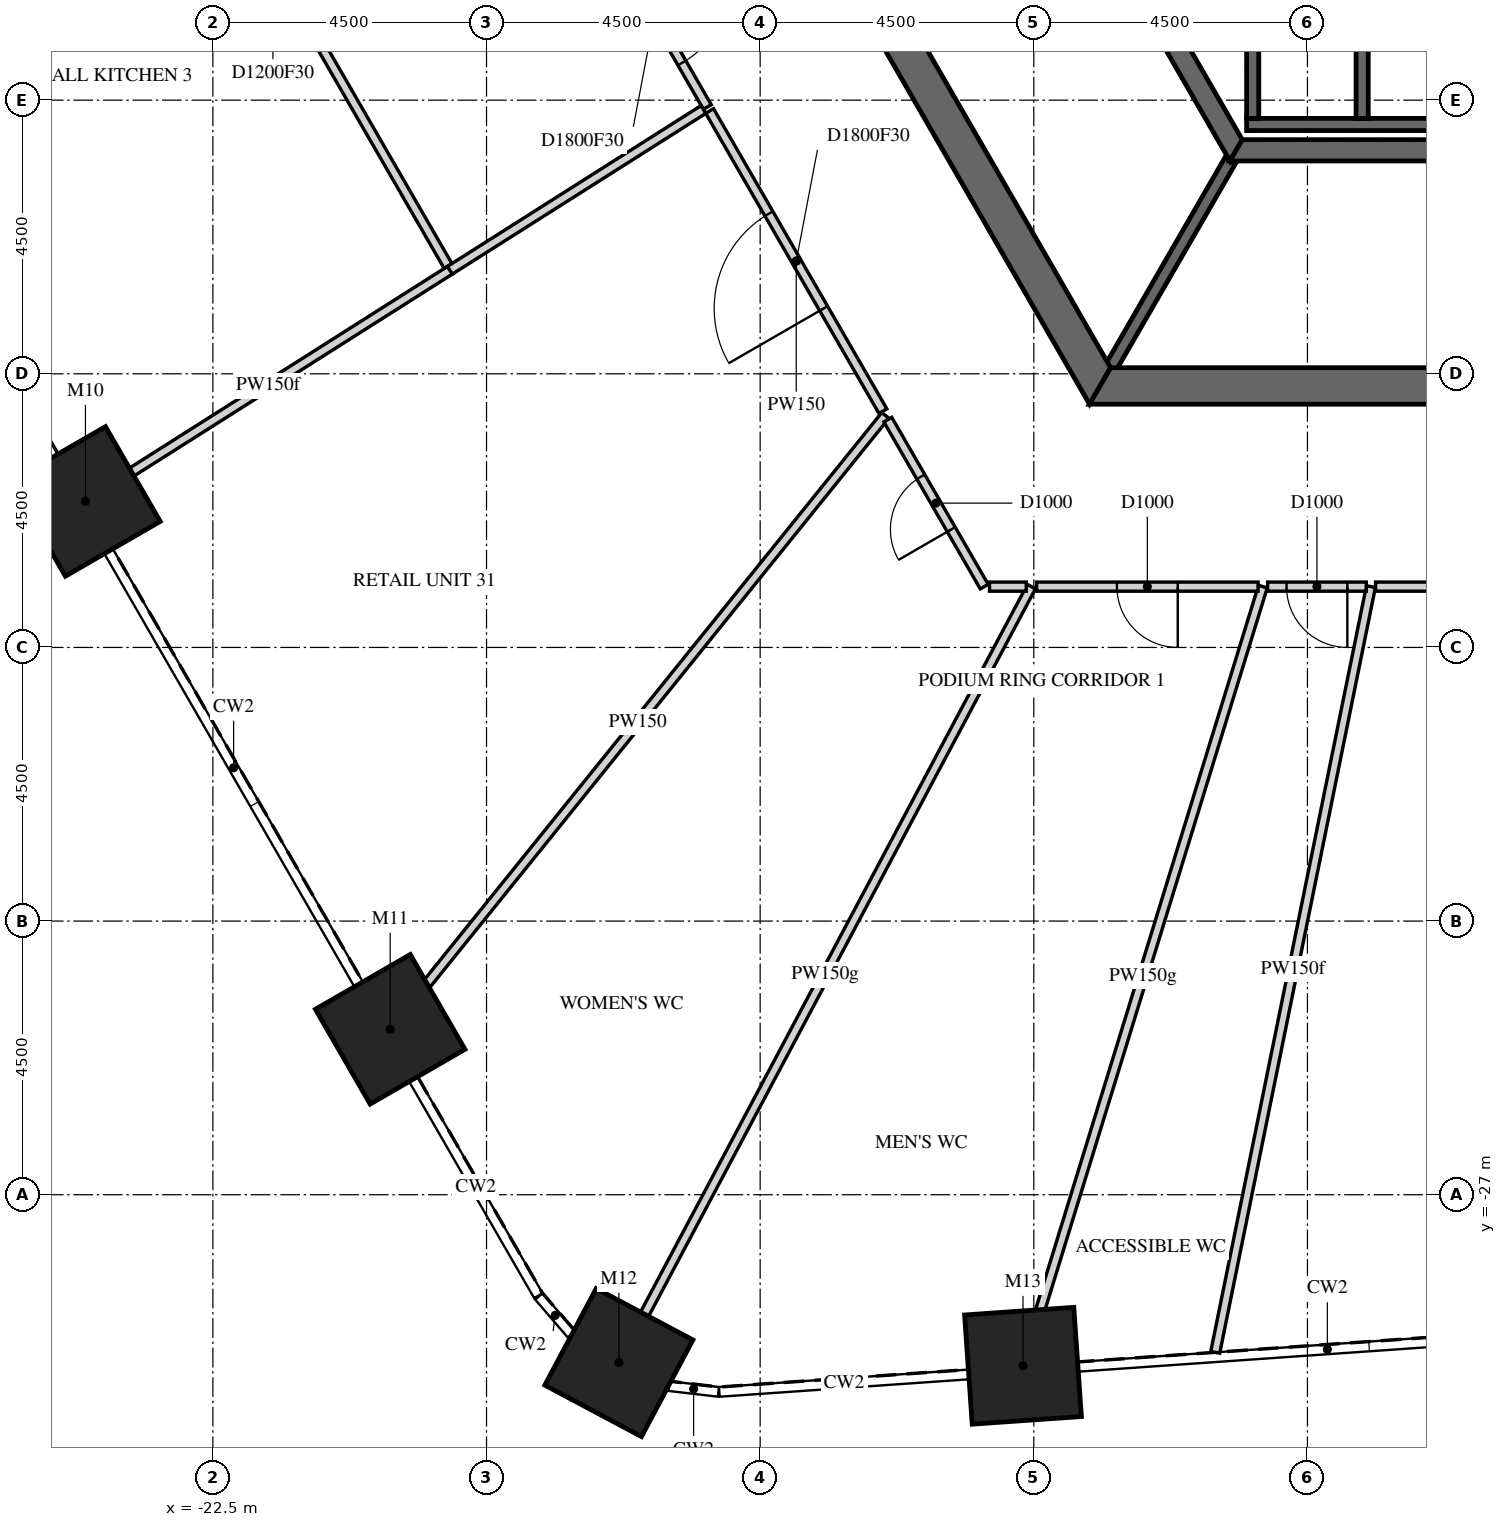
"""IFC4 building model, lengths in metres.
Left out: names, types, materials, properties, quantities, classifications, styles, units other than length and angle.
Written with IfcOpenShell. Run it as: python <this file> out.ifc"""

import sys

from ifc_helpers import new_model, si_unit, direction, frame, frame_2d, origin, origin_2d, place, context, subcontext, project, spatial, polyline, rectangle, outline, extrude, element, fill, save


model = new_model("IFC4")
c1 = context("Model", 3, precision=1e-05, world=origin(), true_north=direction((0.0, 1.0)))
c2 = subcontext(c1, "Body", "Model", "MODEL_VIEW")
j1 = project(units=[si_unit("LENGTHUNIT", "METRE"), si_unit("PLANEANGLEUNIT", "RADIAN")], contexts=[c1])
p1 = place(None, origin())
s1 = spatial("IfcSite", under=j1, at=p1, CompositionType="ELEMENT")
p2 = place(p1, origin())
s2 = spatial("IfcBuilding", under=s1, at=p2, CompositionType="ELEMENT")
p3 = place(p2, frame((0.0, 0.0, 20.5)))
s3 = spatial("IfcBuildingStorey", under=s2, at=p3, CompositionType="ELEMENT", Elevation=20.5)
for number, where, z_axis, x_axis in (
    (1, (-24.596, -15.599, -0.25), (0.0, 0.0, 1.0), (-0.5, 0.866, 0.0)),
    (2, (-19.584, -24.28, -0.25), (0.0, 0.0, 1.0), (-0.5, 0.866, 0.0)),
    (3, (-15.823, -29.76, -0.25), (0.0, 0.0, 1.0), (-0.883, 0.469, 0.0)),
    (4, (-9.177, -29.813, -0.25), (0.0, 0.0, 1.0), (-0.998, -0.07, 0.0)),
):
    element("IfcColumn", number, at=place(p3, frame(where, z_axis=z_axis, x_axis=x_axis)), inside=s3, PredefinedType="COLUMN", context=c2, shape_type="SweptSolid", body=[
        extrude(rectangle(XDim=1.8, YDim=1.8, at=origin_2d()), origin(), (0.0, 0.0, 1.0), 5.5),
    ])
p4 = place(p3, frame((-15.819, 0.0, -0.25), z_axis=(0.0, 0.0, 1.0), x_axis=(0.499999880136, -0.866025472988, 0.0)))
e5 = element("IfcWall", 5, at=p4, inside=s3, PredefinedType="SHEAR", context=c2, shape_type="SweptSolid", body=[
    extrude(outline(polyline([(-0.173, -0.3), (15.993, -0.3), (15.646, 0.3), (0.173, 0.3), (-0.173, -0.3)])), origin(), (0.0, 0.0, 1.0), 5.5),
])
p5 = place(p4, frame((6.981, 0.0, 0.25)))
e6 = element("IfcOpeningElement", 6, at=p5, cuts=e5, PredefinedType="OPENING", context=c2, shape_type="SweptSolid", body=[
    extrude(rectangle(XDim=1.8, YDim=2.4, at=frame_2d((0.9, 1.2))), frame((0.0, 0.31, 0.0), z_axis=(0.0, -1.0, 0.0), x_axis=(1.0, 0.0, 0.0)), (0.0, 0.0, 1.0), 0.62),
])
p6 = place(p3, frame((-7.91, -13.7, -0.25), z_axis=(0.0, 0.0, 1.0), x_axis=(1.0, 0.0, 0.0)))
e7 = element("IfcWall", 7, at=p6, inside=s3, PredefinedType="SHEAR", context=c2, shape_type="SweptSolid", body=[
    extrude(outline(polyline([(-0.173, -0.3), (15.993, -0.3), (15.646, 0.3), (0.173, 0.3), (-0.173, -0.3)])), origin(), (0.0, 0.0, 1.0), 5.5),
])
p7 = place(p6, frame((7.31, 0.0, 0.25)))
e8 = element("IfcOpeningElement", 8, at=p7, cuts=e7, PredefinedType="OPENING", context=c2, shape_type="SweptSolid", body=[
    extrude(rectangle(XDim=1.2, YDim=2.4, at=frame_2d((0.6, 1.2))), frame((0.0, 0.31, 0.0), z_axis=(0.0, -1.0, 0.0), x_axis=(1.0, 0.0, 0.0)), (0.0, 0.0, 1.0), 0.62),
])
p8 = place(p3, frame((-11.345, 0.0, -0.25), z_axis=(0.0, 0.0, 1.0), x_axis=(0.499995046907, -0.866028263435, 0.0)))
e9 = element("IfcWall", 9, at=p8, inside=s3, PredefinedType="SHEAR", context=c2, shape_type="SweptSolid", body=[
    extrude(outline(polyline([(-0.101, -0.175), (11.446, -0.175), (11.244, 0.175), (0.101, 0.175), (-0.101, -0.175)])), origin(), (0.0, 0.0, 1.0), 5.5),
])
p9 = place(p8, frame((4.744, 0.0, 0.25)))
e10 = element("IfcOpeningElement", 10, at=p9, cuts=e9, PredefinedType="OPENING", context=c2, shape_type="SweptSolid", body=[
    extrude(rectangle(XDim=1.8, YDim=2.4, at=frame_2d((0.9, 1.2))), frame((0.0, 0.185, 0.0), z_axis=(0.0, -1.0, 0.0), x_axis=(1.0, 0.0, 0.0)), (0.0, 0.0, 1.0), 0.37),
])
p10 = place(p3, frame((-5.673, -9.825, -0.25), z_axis=(0.0, 0.0, 1.0), x_axis=(1.0, 0.0, 0.0)))
e11 = element("IfcWall", 11, at=p10, inside=s3, PredefinedType="SHEAR", context=c2, shape_type="SweptSolid", body=[
    extrude(outline(polyline([(-0.101, -0.175), (11.446, -0.175), (11.244, 0.175), (0.101, 0.175), (-0.101, -0.175)])), origin(), (0.0, 0.0, 1.0), 5.5),
])
p11 = place(p3, frame((-5.5, -9.4, -0.25), z_axis=(0.0, 0.0, 1.0), x_axis=(1.0, 0.0, 0.0)))
e12 = element("IfcWall", 12, at=p11, inside=s3, PredefinedType="SHEAR", context=c2, shape_type="SweptSolid", body=[
    extrude(rectangle(XDim=9.2, YDim=0.2, at=frame_2d((4.6, 0.0))), origin(), (0.0, 0.0, 1.0), 5.5),
])
for number, where, z_axis, x_axis in (
    (13, (-5.4, -9.3, -0.25), (0.0, 0.0, 1.0), (0.0, 1.0, 0.0)),
    (14, (-3.6, -9.3, -0.25), (0.0, 0.0, 1.0), (0.0, 1.0, 0.0)),
):
    element("IfcWall", number, at=place(p3, frame(where, z_axis=z_axis, x_axis=x_axis)), inside=s3, PredefinedType="SHEAR", context=c2, shape_type="SweptSolid", body=[
        extrude(rectangle(XDim=2.9, YDim=0.2, at=frame_2d((1.45, 0.0))), origin(), (0.0, 0.0, 1.0), 5.5),
    ])
p12 = place(p3, frame((-5.773, -10.0, -0.25), z_axis=(0.0, 0.0, 1.0), x_axis=(-0.500038251005, -0.86600331843, 0.0)))
e15 = element("IfcWall", 15, at=p12, inside=s3, PredefinedType="SHEAR", context=c2, shape_type="SweptSolid", body=[
    extrude(rectangle(XDim=3.926, YDim=0.2, at=frame_2d((1.963, 0.0))), origin(), (0.0, 0.0, 1.0), 5.5),
])
p13 = place(p3, frame((-24.596, -15.599, 0.0), z_axis=(0.0, 0.0, 1.0), x_axis=(0.844481327027, 0.535584996339, 0.0)))
e16 = element("IfcWall", 16, at=p13, inside=s3, PredefinedType="PARTITIONING", context=c2, shape_type="SweptSolid", body=[
    extrude(rectangle(XDim=7.116, YDim=0.15, at=frame_2d((3.558, 0.0))), origin(), (0.0, 0.0, 1.0), 4.496),
])
p14 = place(p3, frame((-18.633, -11.728, 0.0), z_axis=(0.0, 0.0, 1.0), x_axis=(-0.499963358889, 0.866046557506, 0.0)))
e17 = element("IfcWall", 17, at=p14, inside=s3, PredefinedType="PARTITIONING", context=c2, shape_type="SweptSolid", body=[
    extrude(rectangle(XDim=11.521, YDim=0.15, at=frame_2d((5.761, 0.0))), origin(), (0.0, 0.0, 1.0), 5.25),
])
p15 = place(p14, frame((5.161, 0.0, 0.0)))
e18 = element("IfcOpeningElement", 18, at=p15, cuts=e17, PredefinedType="OPENING", context=c2, shape_type="SweptSolid", body=[
    extrude(rectangle(XDim=1.2, YDim=2.1, at=frame_2d((0.6, 1.05))), frame((0.0, 0.085, 0.0), z_axis=(0.0, -1.0, 0.0), x_axis=(1.0, 0.0, 0.0)), (0.0, 0.0, 1.0), 0.17),
])
p16 = place(p3, frame((-19.584, -24.28, 0.0), z_axis=(0.0, 0.0, 1.0), x_axis=(0.627807267634, 0.77836882948, 0.0)))
e19 = element("IfcWall", 19, at=p16, inside=s3, PredefinedType="PARTITIONING", context=c2, shape_type="SweptSolid", body=[
    extrude(rectangle(XDim=12.971, YDim=0.15, at=frame_2d((6.485, 0.0))), origin(), (0.0, 0.0, 1.0), 5.25),
])
p17 = place(p3, frame((-18.649, -1.7, 0.0), z_axis=(0.0, 0.0, 1.0), x_axis=(0.499985805234, -0.866033598981, 0.0)))
e20 = element("IfcWall", 20, at=p17, inside=s3, PredefinedType="PARTITIONING", context=c2, shape_type="SweptSolid", body=[
    extrude(rectangle(XDim=8.56, YDim=0.15, at=frame_2d((4.28, 0.0))), origin(), (0.0, 0.0, 1.0), 5.25),
])
p18 = place(p17, frame((0.836, 0.0, 0.0)))
e21 = element("IfcOpeningElement", 21, at=p18, cuts=e20, PredefinedType="OPENING", context=c2, shape_type="SweptSolid", body=[
    extrude(rectangle(XDim=1.8, YDim=2.1, at=frame_2d((0.9, 1.05))), frame((0.0, 0.085, 0.0), z_axis=(0.0, -1.0, 0.0), x_axis=(1.0, 0.0, 0.0)), (0.0, 0.0, 1.0), 0.17),
])
p19 = place(p17, frame((3.38, 0.0, 0.0)))
e22 = element("IfcOpeningElement", 22, at=p19, cuts=e20, PredefinedType="OPENING", context=c2, shape_type="SweptSolid", body=[
    extrude(rectangle(XDim=1.8, YDim=2.1, at=frame_2d((0.9, 1.05))), frame((0.0, 0.085, 0.0), z_axis=(0.0, -1.0, 0.0), x_axis=(1.0, 0.0, 0.0)), (0.0, 0.0, 1.0), 0.17),
])
p20 = place(p17, frame((5.924, 0.0, 0.0)))
e23 = element("IfcOpeningElement", 23, at=p20, cuts=e20, PredefinedType="OPENING", context=c2, shape_type="SweptSolid", body=[
    extrude(rectangle(XDim=1.8, YDim=2.1, at=frame_2d((0.9, 1.05))), frame((0.0, 0.085, 0.0), z_axis=(0.0, -1.0, 0.0), x_axis=(1.0, 0.0, 0.0)), (0.0, 0.0, 1.0), 0.17),
])
p21 = place(p3, frame((-18.603, -11.798, 0.0), z_axis=(0.0, 0.0, 1.0), x_axis=(0.844511305062, 0.535537725677, 0.0)))
e24 = element("IfcWall", 24, at=p21, inside=s3, PredefinedType="PARTITIONING", context=c2, shape_type="SweptSolid", body=[
    extrude(rectangle(XDim=4.938, YDim=0.15, at=frame_2d((2.469, 0.0))), origin(), (0.0, 0.0, 1.0), 4.496),
])
p22 = place(p3, frame((-15.824, -29.76, 0.0), z_axis=(0.0, 0.0, 1.0), x_axis=(0.469487453171, 0.882939143608, 0.0)))
e25 = element("IfcWall", 25, at=p22, inside=s3, PredefinedType="PARTITIONING", context=c2, shape_type="SweptSolid", body=[
    extrude(rectangle(XDim=14.452, YDim=0.15, at=frame_2d((7.226, 0.0))), origin(), (0.0, 0.0, 1.0), 4.488),
])
p23 = place(p3, frame((-11.481, -14.114, 0.0), z_axis=(0.0, 0.0, 1.0), x_axis=(-0.500049947645, 0.865996564577, 0.0)))
e26 = element("IfcWall", 26, at=p23, inside=s3, PredefinedType="PARTITIONING", context=c2, shape_type="SweptSolid", body=[
    extrude(rectangle(XDim=5.7, YDim=0.15, at=frame_2d((2.85, 0.0))), origin(), (0.0, 0.0, 1.0), 5.25),
])
p24 = place(p23, frame((1.95, 0.0, 0.0)))
e27 = element("IfcOpeningElement", 27, at=p24, cuts=e26, PredefinedType="OPENING", context=c2, shape_type="SweptSolid", body=[
    extrude(rectangle(XDim=1.8, YDim=2.1, at=frame_2d((0.9, 1.05))), frame((0.0, 0.085, 0.0), z_axis=(0.0, -1.0, 0.0), x_axis=(1.0, 0.0, 0.0)), (0.0, 0.0, 1.0), 0.17),
])
p25 = place(p3, frame((-9.815, -17.0, 0.0), z_axis=(0.0, 0.0, 1.0), x_axis=(-0.500080068905, 0.865979171045, 0.0)))
e28 = element("IfcWall", 28, at=p25, inside=s3, PredefinedType="PARTITIONING", context=c2, shape_type="SweptSolid", body=[
    extrude(rectangle(XDim=3.171, YDim=0.15, at=frame_2d((1.586, 0.0))), origin(), (0.0, 0.0, 1.0), 5.25),
])
p26 = place(p25, frame((1.086, 0.0, 0.0)))
e29 = element("IfcOpeningElement", 29, at=p26, cuts=e28, PredefinedType="OPENING", context=c2, shape_type="SweptSolid", body=[
    extrude(rectangle(XDim=1.0, YDim=2.1, at=frame_2d((0.5, 1.05))), frame((0.0, 0.085, 0.0), z_axis=(0.0, -1.0, 0.0), x_axis=(1.0, 0.0, 0.0)), (0.0, 0.0, 1.0), 0.17),
])
p27 = place(p3, frame((-9.729, -17.0, 0.0), z_axis=(0.0, 0.0, 1.0), x_axis=(1.0, 0.0, 0.0)))
e30 = element("IfcWall", 30, at=p27, inside=s3, PredefinedType="PARTITIONING", context=c2, shape_type="SweptSolid", body=[
    extrude(rectangle(XDim=0.604, YDim=0.15, at=frame_2d((0.302, 0.0))), origin(), (0.0, 0.0, 1.0), 5.25),
])
p28 = place(p3, frame((-9.177, -29.813, 0.0), z_axis=(0.0, 0.0, 1.0), x_axis=(0.29419717946, 0.955744746048, 0.0)))
e31 = element("IfcWall", 31, at=p28, inside=s3, PredefinedType="PARTITIONING", context=c2, shape_type="SweptSolid", body=[
    extrude(rectangle(XDim=13.406, YDim=0.15, at=frame_2d((6.703, 0.0))), origin(), (0.0, 0.0, 1.0), 4.488),
])
p29 = place(p3, frame((-5.312, -17.0, 0.0), z_axis=(0.0, 0.0, 1.0), x_axis=(-1.0, 0.0, 0.0)))
e32 = element("IfcWall", 32, at=p29, inside=s3, PredefinedType="PARTITIONING", context=c2, shape_type="SweptSolid", body=[
    extrude(rectangle(XDim=3.643, YDim=0.15, at=frame_2d((1.821, 0.0))), origin(), (0.0, 0.0, 1.0), 5.25),
])
p30 = place(p29, frame((1.321, 0.0, 0.0)))
e33 = element("IfcOpeningElement", 33, at=p30, cuts=e32, PredefinedType="OPENING", context=c2, shape_type="SweptSolid", body=[
    extrude(rectangle(XDim=1.0, YDim=2.1, at=frame_2d((0.5, 1.05))), frame((0.0, 0.085, 0.0), z_axis=(0.0, -1.0, 0.0), x_axis=(1.0, 0.0, 0.0)), (0.0, 0.0, 1.0), 0.17),
])
p31 = place(p3, frame((-6.016, -29.592, 0.0), z_axis=(0.0, 0.0, 1.0), x_axis=(0.199231841521, 0.979952383192, 0.0)))
e34 = element("IfcWall", 34, at=p31, inside=s3, PredefinedType="PARTITIONING", context=c2, shape_type="SweptSolid", body=[
    extrude(rectangle(XDim=12.85, YDim=0.15, at=frame_2d((6.425, 0.0))), origin(), (0.0, 0.0, 1.0), 4.496),
])
p32 = place(p3, frame((-3.532, -17.0, 0.0), z_axis=(0.0, 0.0, 1.0), x_axis=(-1.0, 0.0, 0.0)))
e35 = element("IfcWall", 35, at=p32, inside=s3, PredefinedType="PARTITIONING", context=c2, shape_type="SweptSolid", body=[
    extrude(rectangle(XDim=1.622, YDim=0.15, at=frame_2d((0.811, 0.0))), origin(), (0.0, 0.0, 1.0), 5.25),
])
p33 = place(p32, frame((0.311, 0.0, 0.0)))
e36 = element("IfcOpeningElement", 36, at=p33, cuts=e35, PredefinedType="OPENING", context=c2, shape_type="SweptSolid", body=[
    extrude(rectangle(XDim=1.0, YDim=2.1, at=frame_2d((0.5, 1.05))), frame((0.0, 0.085, 0.0), z_axis=(0.0, -1.0, 0.0), x_axis=(1.0, 0.0, 0.0)), (0.0, 0.0, 1.0), 0.17),
])
p34 = place(p3, frame((-3.379, -17.0, 0.0), z_axis=(0.0, 0.0, 1.0), x_axis=(1.0, 0.0, 0.0)))
e37 = element("IfcWall", 37, at=p34, inside=s3, PredefinedType="PARTITIONING", context=c2, shape_type="SweptSolid", body=[
    extrude(rectangle(XDim=3.379, YDim=0.15, at=frame_2d((1.69, 0.0))), origin(), (0.0, 0.0, 1.0), 5.25),
])
p35 = place(p20, origin())
e38 = element("IfcDoor", 38, at=p35, inside=s3, OperationType="DOUBLE_DOOR_SINGLE_SWING", PredefinedType="DOOR", context=c2, shape_type="SweptSolid", body=[
    extrude(rectangle(XDim=1.8, YDim=2.1, at=frame_2d((0.9, 1.05))), frame((0.0, 0.025, 0.0), z_axis=(0.0, -1.0, 0.0), x_axis=(1.0, 0.0, 0.0)), (0.0, 0.0, 1.0), 0.05),
])
fill(e23, e38)
p36 = place(p24, origin())
e39 = element("IfcDoor", 39, at=p36, inside=s3, OperationType="DOUBLE_DOOR_SINGLE_SWING", PredefinedType="DOOR", context=c2, shape_type="SweptSolid", body=[
    extrude(rectangle(XDim=1.8, YDim=2.1, at=frame_2d((0.9, 1.05))), frame((0.0, 0.025, 0.0), z_axis=(0.0, -1.0, 0.0), x_axis=(1.0, 0.0, 0.0)), (0.0, 0.0, 1.0), 0.05),
])
fill(e27, e39)
p37 = place(p26, origin())
e40 = element("IfcDoor", 40, at=p37, inside=s3, OperationType="SINGLE_SWING_LEFT", PredefinedType="DOOR", context=c2, shape_type="SweptSolid", body=[
    extrude(rectangle(XDim=1.0, YDim=2.1, at=frame_2d((0.5, 1.05))), frame((0.0, 0.025, 0.0), z_axis=(0.0, -1.0, 0.0), x_axis=(1.0, 0.0, 0.0)), (0.0, 0.0, 1.0), 0.05),
])
fill(e29, e40)
p38 = place(p30, origin())
e41 = element("IfcDoor", 41, at=p38, inside=s3, OperationType="SINGLE_SWING_LEFT", PredefinedType="DOOR", context=c2, shape_type="SweptSolid", body=[
    extrude(rectangle(XDim=1.0, YDim=2.1, at=frame_2d((0.5, 1.05))), frame((0.0, 0.025, 0.0), z_axis=(0.0, -1.0, 0.0), x_axis=(1.0, 0.0, 0.0)), (0.0, 0.0, 1.0), 0.05),
])
fill(e33, e41)
p39 = place(p33, origin())
e42 = element("IfcDoor", 42, at=p39, inside=s3, OperationType="SINGLE_SWING_RIGHT", PredefinedType="DOOR", context=c2, shape_type="SweptSolid", body=[
    extrude(rectangle(XDim=1.0, YDim=2.1, at=frame_2d((0.5, 1.05))), frame((0.0, 0.025, 0.0), z_axis=(0.0, -1.0, 0.0), x_axis=(1.0, 0.0, 0.0)), (0.0, 0.0, 1.0), 0.05),
])
fill(e36, e42)
save(model, sys.argv[1])
